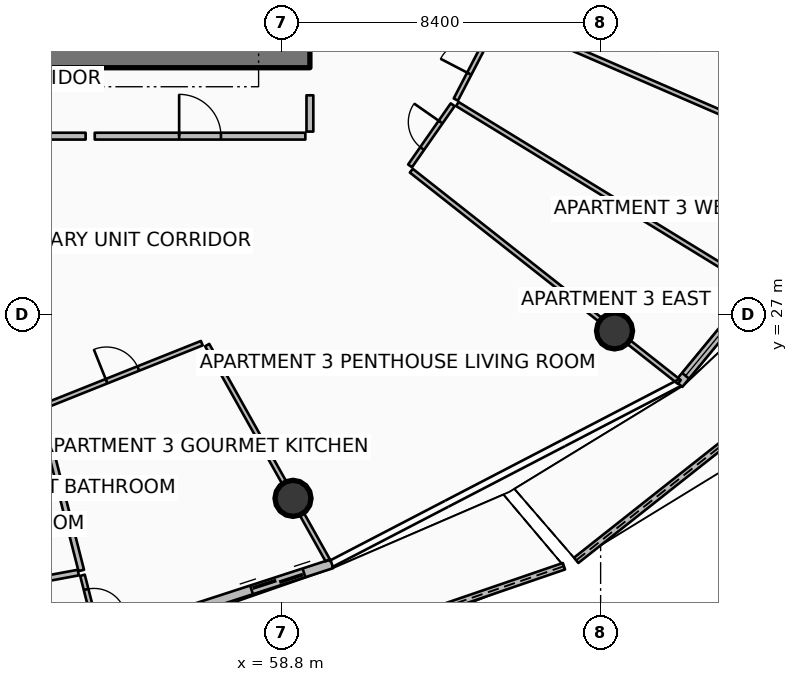
"""IFC4 building model, lengths in metres.
Left out: names, types, materials, properties, quantities, classifications, styles, units other than length and angle.
Written with IfcOpenShell. Run it as: python <this file> out.ifc"""

import sys

from ifc_helpers import new_model, si_unit, direction, frame, frame_2d, origin, origin_2d, place, context, subcontext, project, spatial, polyline, rectangle, circle, outline, extrude, element, fill, save


model = new_model("IFC4")
c1 = context("Model", 3, precision=1e-05, world=origin(), true_north=direction((0.0, 1.0)))
c2 = subcontext(c1, "Body", "Model", "MODEL_VIEW")
j1 = project(units=[si_unit("LENGTHUNIT", "METRE"), si_unit("PLANEANGLEUNIT", "RADIAN")], contexts=[c1])
p1 = place(None, origin())
s1 = spatial("IfcSite", under=j1, at=p1, CompositionType="ELEMENT")
p2 = place(p1, origin())
s2 = spatial("IfcBuilding", under=s1, at=p2, CompositionType="ELEMENT")
p3 = place(p2, frame((0.0, 0.0, 282.9)))
s3 = spatial("IfcBuildingStorey", under=s2, at=p3, CompositionType="ELEMENT", Elevation=282.9)
p4 = place(p3, frame((49.95, 33.75, 0.0), z_axis=(0.0, 0.0, 1.0), x_axis=(1.0, 0.0, 0.0)))
e1 = element("IfcWall", 1, at=p4, inside=s3, PredefinedType="SHEAR", context=c2, shape_type="SweptSolid", body=[
    extrude(rectangle(XDim=9.6, YDim=0.5, at=frame_2d((4.8, 0.0))), origin(), (0.0, 0.0, 1.0), 3.85),
])
for number, where, z_axis, x_axis in (
    (2, (59.105, 22.17, 0.0), (0.0, 0.0, 1.0), (1.0, 0.0, 0.0)),
    (3, (67.566, 26.575, 0.0), (0.0, 0.0, 1.0), (1.0, 0.0, 0.0)),
):
    element("IfcColumn", number, at=place(p3, frame(where, z_axis=z_axis, x_axis=x_axis)), inside=s3, PredefinedType="COLUMN", context=c2, shape_type="SweptSolid", body=[
        extrude(circle(Radius=0.475, at=origin_2d()), origin(), (0.0, 0.0, 1.0), 3.59),
    ])
p5 = place(p3, frame((56.26, 16.966, 0.0), z_axis=(0.0, 0.0, 1.0), x_axis=(0.945994037051, 0.32418402469, 0.0)))
e4 = element("IfcWall", 4, at=p5, inside=s3, PredefinedType="PARAPET", context=c2, shape_type="SweptSolid", body=[
    extrude(outline(polyline([(0.0, 0.0), (10.544, 0.0), (10.544, 1.747), (5.272, 1.562), (0.0, 1.348), (0.0, 0.0)])), frame((0.0, 0.09, 0.0), z_axis=(0.0, -1.0, 0.0), x_axis=(1.0, 0.0, 0.0)), (0.0, 0.0, 1.0), 0.18),
])
p6 = place(p3, frame((66.557, 20.539, 0.0), z_axis=(0.0, 0.0, 1.0), x_axis=(0.784536716277, 0.620082366153, 0.0)))
e5 = element("IfcWall", 5, at=p6, inside=s3, PredefinedType="PARAPET", context=c2, shape_type="SweptSolid", body=[
    extrude(outline(polyline([(0.0, 0.0), (11.652, 0.0), (11.652, 1.832), (5.826, 1.853), (0.0, 1.756), (0.0, 0.0)])), frame((0.0, 0.09, 0.0), z_axis=(0.0, -1.0, 0.0), x_axis=(1.0, 0.0, 0.0)), (0.0, 0.0, 1.0), 0.18),
])
p7 = place(p3, frame((50.858, 17.436, 0.0), z_axis=(0.0, 0.0, 1.0), x_axis=(0.951055974609, 0.309018661507, 0.0)))
e6 = element("IfcWall", 6, at=p7, inside=s3, PredefinedType="SOLIDWALL", context=c2, shape_type="SweptSolid", body=[
    extrude(rectangle(XDim=9.745, YDim=0.24, at=frame_2d((4.873, 0.0))), origin(), (0.0, 0.0, 1.0), 2.54),
])
p8 = place(p7, frame((7.525, 0.0, 0.0)))
e7 = element("IfcOpeningElement", 7, at=p8, cuts=e6, PredefinedType="OPENING", context=c2, shape_type="SweptSolid", body=[
    extrude(rectangle(XDim=1.45, YDim=2.15, at=frame_2d((0.725, 1.075))), frame((0.0, 0.13, 0.0), z_axis=(0.0, -1.0, 0.0), x_axis=(1.0, 0.0, 0.0)), (0.0, 0.0, 1.0), 0.26),
])
p9 = place(p7, frame((0.28, 0.0, 0.65)))
e8 = element("IfcOpeningElement", 8, at=p9, cuts=e6, PredefinedType="OPENING", context=c2, shape_type="SweptSolid", body=[
    extrude(rectangle(XDim=1.6, YDim=1.5, at=frame_2d((0.8, 0.75))), frame((0.0, 0.13, 0.0), z_axis=(0.0, -1.0, 0.0), x_axis=(1.0, 0.0, 0.0)), (0.0, 0.0, 1.0), 0.26),
])
p10 = place(p3, frame((69.258, 25.178, 0.0), z_axis=(0.0, 0.0, 1.0), x_axis=(0.636680093065, 0.771128043255, 0.0)))
e9 = element("IfcWall", 9, at=p10, inside=s3, PredefinedType="SOLIDWALL", context=c2, shape_type="SweptSolid", body=[
    extrude(rectangle(XDim=11.438, YDim=0.24, at=frame_2d((5.719, 0.0))), origin(), (0.0, 0.0, 1.0), 2.54),
])
p11 = place(p10, frame((9.218, 0.0, 0.0)))
e10 = element("IfcOpeningElement", 10, at=p11, cuts=e9, PredefinedType="OPENING", context=c2, shape_type="SweptSolid", body=[
    extrude(rectangle(XDim=1.45, YDim=2.15, at=frame_2d((0.725, 1.075))), frame((0.0, 0.13, 0.0), z_axis=(0.0, -1.0, 0.0), x_axis=(1.0, 0.0, 0.0)), (0.0, 0.0, 1.0), 0.26),
])
p12 = place(p10, frame((0.28, 0.0, 0.65)))
e11 = element("IfcOpeningElement", 11, at=p12, cuts=e9, PredefinedType="OPENING", context=c2, shape_type="SweptSolid", body=[
    extrude(rectangle(XDim=1.6, YDim=1.5, at=frame_2d((0.8, 0.75))), frame((0.0, 0.13, 0.0), z_axis=(0.0, -1.0, 0.0), x_axis=(1.0, 0.0, 0.0)), (0.0, 0.0, 1.0), 0.26),
])
p13 = place(p3, frame((53.888, 31.7, 0.0), z_axis=(0.0, 0.0, 1.0), x_axis=(1.0, 0.0, 0.0)))
e12 = element("IfcWall", 12, at=p13, inside=s3, PredefinedType="PARTITIONING", context=c2, shape_type="SweptSolid", body=[
    extrude(rectangle(XDim=5.542, YDim=0.18, at=frame_2d((2.771, 0.0))), origin(), (0.0, 0.0, 1.0), 2.957),
])
p14 = place(p13, frame((2.221, 0.0, 0.0)))
e13 = element("IfcOpeningElement", 13, at=p14, cuts=e12, PredefinedType="OPENING", context=c2, shape_type="SweptSolid", body=[
    extrude(rectangle(XDim=1.1, YDim=2.1, at=frame_2d((0.55, 1.05))), frame((0.0, 0.1, 0.0), z_axis=(0.0, -1.0, 0.0), x_axis=(1.0, 0.0, 0.0)), (0.0, 0.0, 1.0), 0.2),
])
p15 = place(p3, frame((59.55, 31.82, 0.0), z_axis=(0.0, 0.0, 1.0), x_axis=(0.0, 1.0, 0.0)))
e14 = element("IfcWall", 14, at=p15, inside=s3, PredefinedType="PARTITIONING", context=c2, shape_type="SweptSolid", body=[
    extrude(rectangle(XDim=0.955, YDim=0.18, at=frame_2d((0.477, 0.0))), origin(), (0.0, 0.0, 1.0), 2.957),
])
p16 = place(p3, frame((49.339, 31.7, 0.0), z_axis=(0.0, 0.0, 1.0), x_axis=(1.0, 0.0, 0.0)))
e15 = element("IfcWall", 15, at=p16, inside=s3, PredefinedType="PARTITIONING", context=c2, shape_type="SweptSolid", body=[
    extrude(rectangle(XDim=4.309, YDim=0.18, at=frame_2d((2.155, 0.0))), origin(), (0.0, 0.0, 1.0), 2.957),
])
p17 = place(p3, frame((56.847, 26.203, 0.0), z_axis=(0.0, 0.0, 1.0), x_axis=(0.488636594114, -0.872487409017, 0.0)))
e16 = element("IfcWall", 16, at=p17, inside=s3, PredefinedType="PARTITIONING", context=c2, shape_type="SweptSolid", body=[
    extrude(rectangle(XDim=6.489, YDim=0.125, at=frame_2d((3.244, 0.0))), origin(), (0.0, 0.0, 1.0), 2.957),
])
p18 = place(p3, frame((50.738, 19.712, 0.0), z_axis=(0.0, 0.0, 1.0), x_axis=(0.983195760322, 0.18255436693, 0.0)))
e17 = element("IfcWall", 17, at=p18, inside=s3, PredefinedType="PARTITIONING", context=c2, shape_type="SweptSolid", body=[
    extrude(rectangle(XDim=2.763, YDim=0.15, at=frame_2d((1.381, 0.0))), origin(), (0.0, 0.0, 1.0), 2.957),
])
p19 = place(p3, frame((52.466, 24.464, 0.0), z_axis=(0.0, 0.0, 1.0), x_axis=(0.246795883472, -0.969067485731, 0.0)))
e18 = element("IfcWall", 18, at=p19, inside=s3, PredefinedType="PARTITIONING", context=c2, shape_type="SweptSolid", body=[
    extrude(rectangle(XDim=4.326, YDim=0.15, at=frame_2d((2.163, 0.0))), origin(), (0.0, 0.0, 1.0), 3.03),
])
p20 = place(p3, frame((53.565, 20.146, 0.0), z_axis=(0.0, 0.0, 1.0), x_axis=(0.24689818157, -0.969041427359, 0.0)))
e19 = element("IfcWall", 19, at=p20, inside=s3, PredefinedType="PARTITIONING", context=c2, shape_type="SweptSolid", body=[
    extrude(rectangle(XDim=1.619, YDim=0.125, at=frame_2d((0.809, 0.0))), origin(), (0.0, 0.0, 1.0), 3.03),
])
p21 = place(p20, frame((0.385, 0.0, 0.0)))
e20 = element("IfcOpeningElement", 20, at=p21, cuts=e19, PredefinedType="OPENING", context=c2, shape_type="SweptSolid", body=[
    extrude(rectangle(XDim=0.85, YDim=2.06, at=frame_2d((0.425, 1.03))), frame((0.0, 0.073, 0.0), z_axis=(0.0, -1.0, 0.0), x_axis=(1.0, 0.0, 0.0)), (0.0, 0.0, 1.0), 0.145),
])
p22 = place(p3, frame((52.527, 24.584, 0.0), z_axis=(0.0, 0.0, 1.0), x_axis=(0.928678664633, 0.370885343274, 0.0)))
e21 = element("IfcWall", 21, at=p22, inside=s3, PredefinedType="PARTITIONING", context=c2, shape_type="SweptSolid", body=[
    extrude(rectangle(XDim=4.499, YDim=0.125, at=frame_2d((2.249, 0.0))), origin(), (0.0, 0.0, 1.0), 2.957),
])
p23 = place(p22, frame((1.799, 0.0, 0.0)))
e22 = element("IfcOpeningElement", 22, at=p23, cuts=e21, PredefinedType="OPENING", context=c2, shape_type="SweptSolid", body=[
    extrude(rectangle(XDim=0.9, YDim=2.08, at=frame_2d((0.45, 1.04))), frame((0.0, 0.073, 0.0), z_axis=(0.0, -1.0, 0.0), x_axis=(1.0, 0.0, 0.0)), (0.0, 0.0, 1.0), 0.145),
])
p24 = place(p3, frame((62.219, 30.791, 0.0), z_axis=(0.0, 0.0, 1.0), x_axis=(0.785316198055, -0.619094878893, 0.0)))
e23 = element("IfcWall", 23, at=p24, inside=s3, PredefinedType="PARTITIONING", context=c2, shape_type="SweptSolid", body=[
    extrude(rectangle(XDim=8.979, YDim=0.125, at=frame_2d((4.489, 0.0))), origin(), (0.0, 0.0, 1.0), 2.957),
])
p25 = place(p3, frame((63.429, 32.545, 0.0), z_axis=(0.0, 0.0, 1.0), x_axis=(0.852634226121, -0.522508254907, 0.0)))
e24 = element("IfcWall", 24, at=p25, inside=s3, PredefinedType="PARTITIONING", context=c2, shape_type="SweptSolid", body=[
    extrude(rectangle(XDim=9.151, YDim=0.125, at=frame_2d((4.576, 0.0))), origin(), (0.0, 0.0, 1.0), 3.03),
])
p26 = place(p3, frame((64.608, 34.813, 0.0), z_axis=(0.0, 0.0, 1.0), x_axis=(0.917754543675, -0.397148080146, 0.0)))
e25 = element("IfcWall", 25, at=p26, inside=s3, PredefinedType="PARTITIONING", context=c2, shape_type="SweptSolid", body=[
    extrude(rectangle(XDim=9.994, YDim=0.125, at=frame_2d((4.997, 0.0))), origin(), (0.0, 0.0, 1.0), 3.03),
])
p27 = place(p3, frame((62.186, 30.918, 0.0), z_axis=(0.0, 0.0, 1.0), x_axis=(0.571797742108, 0.820394625848, 0.0)))
e26 = element("IfcWall", 26, at=p27, inside=s3, PredefinedType="PARTITIONING", context=c2, shape_type="SweptSolid", body=[
    extrude(rectangle(XDim=1.96, YDim=0.125, at=frame_2d((0.98, 0.0))), origin(), (0.0, 0.0, 1.0), 2.957),
])
p28 = place(p27, frame((0.555, 0.0, 0.0)))
e27 = element("IfcOpeningElement", 27, at=p28, cuts=e26, PredefinedType="OPENING", context=c2, shape_type="SweptSolid", body=[
    extrude(rectangle(XDim=0.85, YDim=2.06, at=frame_2d((0.425, 1.03))), frame((0.0, 0.073, 0.0), z_axis=(0.0, -1.0, 0.0), x_axis=(1.0, 0.0, 0.0)), (0.0, 0.0, 1.0), 0.145),
])
p29 = place(p3, frame((63.389, 32.663, 0.0), z_axis=(0.0, 0.0, 1.0), x_axis=(0.461007635573, 0.887396168542, 0.0)))
e28 = element("IfcWall", 28, at=p29, inside=s3, PredefinedType="PARTITIONING", context=c2, shape_type="SweptSolid", body=[
    extrude(rectangle(XDim=2.384, YDim=0.125, at=frame_2d((1.192, 0.0))), origin(), (0.0, 0.0, 1.0), 3.03),
])
p30 = place(p29, frame((0.767, 0.0, 0.0)))
e29 = element("IfcOpeningElement", 29, at=p30, cuts=e28, PredefinedType="OPENING", context=c2, shape_type="SweptSolid", body=[
    extrude(rectangle(XDim=0.85, YDim=2.06, at=frame_2d((0.425, 1.03))), frame((0.0, 0.073, 0.0), z_axis=(0.0, -1.0, 0.0), x_axis=(1.0, 0.0, 0.0)), (0.0, 0.0, 1.0), 0.145),
])
p31 = place(p8, origin())
e30 = element("IfcDoor", 30, at=p31, inside=s3, OperationType="DOUBLE_DOOR_SLIDING", PredefinedType="DOOR", context=c2, shape_type="SweptSolid", body=[
    extrude(rectangle(XDim=1.45, YDim=2.15, at=frame_2d((0.725, 1.075))), frame((0.0, 0.025, 0.0), z_axis=(0.0, -1.0, 0.0), x_axis=(1.0, 0.0, 0.0)), (0.0, 0.0, 1.0), 0.05),
])
fill(e7, e30)
p32 = place(p12, origin())
e31 = element("IfcWindow", 31, at=p32, inside=s3, PartitioningType="SINGLE_PANEL", PredefinedType="WINDOW", context=c2, shape_type="SweptSolid", body=[
    extrude(rectangle(XDim=1.6, YDim=1.5, at=frame_2d((0.8, 0.75))), frame((0.0, 0.03, 0.0), z_axis=(0.0, -1.0, 0.0), x_axis=(1.0, 0.0, 0.0)), (0.0, 0.0, 1.0), 0.06),
])
fill(e11, e31)
p33 = place(p14, origin())
e32 = element("IfcDoor", 32, at=p33, inside=s3, OperationType="SINGLE_SWING_LEFT", PredefinedType="DOOR", context=c2, shape_type="SweptSolid", body=[
    extrude(rectangle(XDim=1.1, YDim=2.1, at=frame_2d((0.55, 1.05))), frame((0.0, 0.025, 0.0), z_axis=(0.0, -1.0, 0.0), x_axis=(1.0, 0.0, 0.0)), (0.0, 0.0, 1.0), 0.05),
])
fill(e13, e32)
p34 = place(p21, origin())
e33 = element("IfcDoor", 33, at=p34, inside=s3, OperationType="SINGLE_SWING_RIGHT", PredefinedType="DOOR", context=c2, shape_type="SweptSolid", body=[
    extrude(rectangle(XDim=0.85, YDim=2.06, at=frame_2d((0.425, 1.03))), frame((0.0, 0.025, 0.0), z_axis=(0.0, -1.0, 0.0), x_axis=(1.0, 0.0, 0.0)), (0.0, 0.0, 1.0), 0.05),
])
fill(e20, e33)
p35 = place(p23, origin())
e34 = element("IfcDoor", 34, at=p35, inside=s3, OperationType="SINGLE_SWING_LEFT", PredefinedType="DOOR", context=c2, shape_type="SweptSolid", body=[
    extrude(rectangle(XDim=0.9, YDim=2.08, at=frame_2d((0.45, 1.04))), frame((0.0, 0.025, 0.0), z_axis=(0.0, -1.0, 0.0), x_axis=(1.0, 0.0, 0.0)), (0.0, 0.0, 1.0), 0.05),
])
fill(e22, e34)
p36 = place(p28, origin())
e35 = element("IfcDoor", 35, at=p36, inside=s3, OperationType="SINGLE_SWING_RIGHT", PredefinedType="DOOR", context=c2, shape_type="SweptSolid", body=[
    extrude(rectangle(XDim=0.85, YDim=2.06, at=frame_2d((0.425, 1.03))), frame((0.0, 0.025, 0.0), z_axis=(0.0, -1.0, 0.0), x_axis=(1.0, 0.0, 0.0)), (0.0, 0.0, 1.0), 0.05),
])
fill(e27, e35)
p37 = place(p30, origin())
e36 = element("IfcDoor", 36, at=p37, inside=s3, OperationType="SINGLE_SWING_LEFT", PredefinedType="DOOR", context=c2, shape_type="SweptSolid", body=[
    extrude(rectangle(XDim=0.85, YDim=2.06, at=frame_2d((0.425, 1.03))), frame((0.0, 0.025, 0.0), z_axis=(0.0, -1.0, 0.0), x_axis=(1.0, 0.0, 0.0)), (0.0, 0.0, 1.0), 0.05),
])
fill(e29, e36)
save(model, sys.argv[1])
